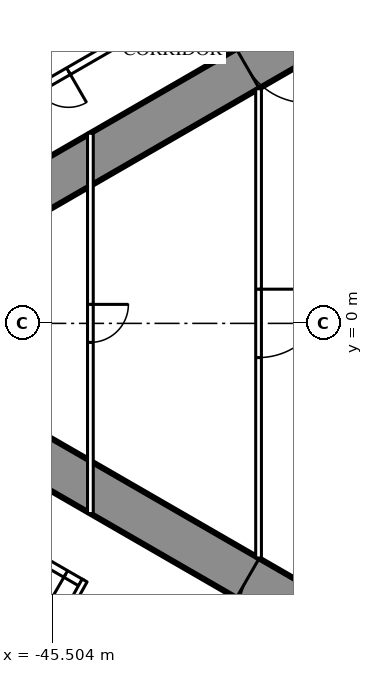
"""IFC4 building model, lengths in metres.
Left out: names, types, materials, properties, quantities, classifications, styles, units other than length and angle.
Written with IfcOpenShell. Run it as: python <this file> out.ifc"""

import sys

from ifc_helpers import new_model, si_unit, direction, frame, frame_2d, origin, place, context, subcontext, project, spatial, rectangle, extrude, element, fill, save


model = new_model("IFC4")
c1 = context("Model", 3, precision=1e-05, world=origin(), true_north=direction((0.0, 1.0)))
c2 = subcontext(c1, "Body", "Model", "MODEL_VIEW")
j1 = project(units=[si_unit("LENGTHUNIT", "METRE"), si_unit("PLANEANGLEUNIT", "RADIAN")], contexts=[c1])
p1 = place(None, origin())
s1 = spatial("IfcSite", under=j1, at=p1, CompositionType="ELEMENT")
p2 = place(p1, origin())
s2 = spatial("IfcBuilding", under=s1, at=p2, CompositionType="ELEMENT")
p3 = place(p2, frame((0.0, 0.0, 226.1)))
s3 = spatial("IfcBuildingStorey", under=s2, at=p3, CompositionType="ELEMENT", Elevation=226.1)
p4 = place(p3, frame((-27.2, 14.3, 0.0), z_axis=(0.0, 0.0, 1.0), x_axis=(-0.866026593062, -0.499997940104, 0.0)))
e1 = element("IfcWall", 1, at=p4, inside=s3, PredefinedType="SHEAR", context=c2, shape_type="SweptSolid", body=[
    extrude(rectangle(XDim=28.946, YDim=1.2, at=frame_2d((14.473, 0.0))), origin(), (0.0, 0.0, 1.0), 3.6),
])
p5 = place(p4, frame((4.6, 0.0, 0.0)))
e2 = element("IfcOpeningElement", 2, at=p5, cuts=e1, PredefinedType="OPENING", context=c2, shape_type="SweptSolid", body=[
    extrude(rectangle(XDim=1.0, YDim=2.2, at=frame_2d((0.5, 1.1))), frame((0.0, 0.61, 0.0), z_axis=(0.0, -1.0, 0.0), x_axis=(1.0, 0.0, 0.0)), (0.0, 0.0, 1.0), 1.22),
])
p6 = place(p4, frame((13.395, 0.0, 0.0)))
e3 = element("IfcOpeningElement", 3, at=p6, cuts=e1, PredefinedType="OPENING", context=c2, shape_type="SweptSolid", body=[
    extrude(rectangle(XDim=1.8, YDim=2.2, at=frame_2d((0.9, 1.1))), frame((0.0, 0.61, 0.0), z_axis=(0.0, -1.0, 0.0), x_axis=(1.0, 0.0, 0.0)), (0.0, 0.0, 1.0), 1.22),
])
p7 = place(p3, frame((-27.2, -14.3, 0.0), z_axis=(0.0, 0.0, 1.0), x_axis=(-0.866024021859, 0.500002393557, 0.0)))
e4 = element("IfcWall", 4, at=p7, inside=s3, PredefinedType="SHEAR", context=c2, shape_type="SweptSolid", body=[
    extrude(rectangle(XDim=27.907, YDim=1.2, at=frame_2d((13.954, 0.0))), origin(), (0.0, 0.0, 1.0), 3.6),
])
p8 = place(p7, frame((4.6, 0.0, 0.0)))
e5 = element("IfcOpeningElement", 5, at=p8, cuts=e4, PredefinedType="OPENING", context=c2, shape_type="SweptSolid", body=[
    extrude(rectangle(XDim=1.0, YDim=2.2, at=frame_2d((0.5, 1.1))), frame((0.0, 0.61, 0.0), z_axis=(0.0, -1.0, 0.0), x_axis=(1.0, 0.0, 0.0)), (0.0, 0.0, 1.0), 1.22),
])
p9 = place(p7, frame((13.395, 0.0, 0.0)))
e6 = element("IfcOpeningElement", 6, at=p9, cuts=e4, PredefinedType="OPENING", context=c2, shape_type="SweptSolid", body=[
    extrude(rectangle(XDim=1.8, YDim=2.2, at=frame_2d((0.9, 1.1))), frame((0.0, 0.61, 0.0), z_axis=(0.0, -1.0, 0.0), x_axis=(1.0, 0.0, 0.0)), (0.0, 0.0, 1.0), 1.22),
])
p10 = place(p3, frame((-44.715, -6.844, 0.0), z_axis=(0.0, 0.0, 1.0), x_axis=(-0.866025261224, 0.500000246922, 0.0)))
e7 = element("IfcWall", 7, at=p10, inside=s3, PredefinedType="PARTITIONING", context=c2, shape_type="SweptSolid", body=[
    extrude(rectangle(XDim=13.567, YDim=0.2, at=frame_2d((6.783, 0.0))), origin(), (0.0, 0.0, 1.0), 3.35),
])
p11 = place(p10, frame((6.266, 0.0, 0.0)))
e8 = element("IfcOpeningElement", 8, at=p11, cuts=e7, PredefinedType="OPENING", context=c2, shape_type="SweptSolid", body=[
    extrude(rectangle(XDim=0.95, YDim=2.2, at=frame_2d((0.475, 1.1))), frame((0.0, 0.11, 0.0), z_axis=(0.0, -1.0, 0.0), x_axis=(1.0, 0.0, 0.0)), (0.0, 0.0, 1.0), 0.22),
])
p12 = place(p10, frame((4.565, 0.0, 0.0)))
e9 = element("IfcOpeningElement", 9, at=p12, cuts=e7, PredefinedType="OPENING", context=c2, shape_type="SweptSolid", body=[
    extrude(rectangle(XDim=0.95, YDim=2.2, at=frame_2d((0.475, 1.1))), frame((0.0, 0.11, 0.0), z_axis=(0.0, -1.0, 0.0), x_axis=(1.0, 0.0, 0.0)), (0.0, 0.0, 1.0), 0.22),
])
p13 = place(p10, frame((0.5, 0.0, 0.0)))
e10 = element("IfcOpeningElement", 10, at=p13, cuts=e7, PredefinedType="OPENING", context=c2, shape_type="SweptSolid", body=[
    extrude(rectangle(XDim=0.967, YDim=2.2, at=frame_2d((0.483, 1.1))), frame((0.0, 0.11, 0.0), z_axis=(0.0, -1.0, 0.0), x_axis=(1.0, 0.0, 0.0)), (0.0, 0.0, 1.0), 0.22),
])
p14 = place(p3, frame((-44.652, -6.764, 0.0), z_axis=(0.0, 0.0, 1.0), x_axis=(-0.485424724123, -0.874278466629, 0.0)))
e11 = element("IfcWall", 11, at=p14, inside=s3, PredefinedType="PARTITIONING", context=c2, shape_type="SweptSolid", body=[
    extrude(rectangle(XDim=1.805, YDim=0.15, at=frame_2d((0.903, 0.0))), origin(), (0.0, 0.0, 1.0), 3.35),
])
p15 = place(p3, frame((-28.737, 16.068, 0.0), z_axis=(0.0, 0.0, 1.0), x_axis=(-0.866023901326, -0.500002602325, 0.0)))
e12 = element("IfcWall", 12, at=p15, inside=s3, PredefinedType="PARTITIONING", context=c2, shape_type="SweptSolid", body=[
    extrude(rectangle(XDim=20.192, YDim=0.2, at=frame_2d((10.096, 0.0))), origin(), (0.0, 0.0, 1.0), 3.35),
])
p16 = place(p15, frame((1.08, 0.0, 0.0)))
e13 = element("IfcOpeningElement", 13, at=p16, cuts=e12, PredefinedType="OPENING", context=c2, shape_type="SweptSolid", body=[
    extrude(rectangle(XDim=1.8, YDim=2.04, at=frame_2d((0.9, 1.02))), frame((0.0, 0.11, 0.0), z_axis=(0.0, -1.0, 0.0), x_axis=(1.0, 0.0, 0.0)), (0.0, 0.0, 1.0), 0.22),
])
p17 = place(p15, frame((6.86, 0.0, 0.0)))
e14 = element("IfcOpeningElement", 14, at=p17, cuts=e12, PredefinedType="OPENING", context=c2, shape_type="SweptSolid", body=[
    extrude(rectangle(XDim=1.0, YDim=2.2, at=frame_2d((0.5, 1.1))), frame((0.0, 0.11, 0.0), z_axis=(0.0, -1.0, 0.0), x_axis=(1.0, 0.0, 0.0)), (0.0, 0.0, 1.0), 0.22),
])
p18 = place(p15, frame((18.867, 0.0, 0.0)))
e15 = element("IfcOpeningElement", 15, at=p18, cuts=e12, PredefinedType="OPENING", context=c2, shape_type="SweptSolid", body=[
    extrude(rectangle(XDim=0.95, YDim=2.2, at=frame_2d((0.475, 1.1))), frame((0.0, 0.11, 0.0), z_axis=(0.0, -1.0, 0.0), x_axis=(1.0, 0.0, 0.0)), (0.0, 0.0, 1.0), 0.22),
])
p19 = place(p3, frame((-40.075, 6.174, 0.0), z_axis=(0.0, 0.0, 1.0), x_axis=(0.0, -1.0, 0.0)))
e16 = element("IfcWall", 16, at=p19, inside=s3, PredefinedType="PARTITIONING", context=c2, shape_type="SweptSolid", body=[
    extrude(rectangle(XDim=12.348, YDim=0.15, at=frame_2d((6.174, 0.0))), origin(), (0.0, 0.0, 1.0), 3.35),
])
p20 = place(p19, frame((5.274, 0.0, 0.0)))
e17 = element("IfcOpeningElement", 17, at=p20, cuts=e16, PredefinedType="OPENING", context=c2, shape_type="SweptSolid", body=[
    extrude(rectangle(XDim=1.8, YDim=2.2, at=frame_2d((0.9, 1.1))), frame((0.0, 0.085, 0.0), z_axis=(0.0, -1.0, 0.0), x_axis=(1.0, 0.0, 0.0)), (0.0, 0.0, 1.0), 0.17),
])
p21 = place(p3, frame((-44.5, 5.005, 0.0), z_axis=(0.0, 0.0, 1.0), x_axis=(0.0, -1.0, 0.0)))
e18 = element("IfcWall", 18, at=p21, inside=s3, PredefinedType="PARTITIONING", context=c2, shape_type="SweptSolid", body=[
    extrude(rectangle(XDim=10.009, YDim=0.15, at=frame_2d((5.005, 0.0))), origin(), (0.0, 0.0, 1.0), 2.5),
])
p22 = place(p21, frame((4.505, 0.0, 0.0)))
e19 = element("IfcOpeningElement", 19, at=p22, cuts=e18, PredefinedType="OPENING", context=c2, shape_type="SweptSolid", body=[
    extrude(rectangle(XDim=1.0, YDim=2.2, at=frame_2d((0.5, 1.1))), frame((0.0, 0.085, 0.0), z_axis=(0.0, -1.0, 0.0), x_axis=(1.0, 0.0, 0.0)), (0.0, 0.0, 1.0), 0.17),
])
p23 = place(p18, origin())
e20 = element("IfcDoor", 20, at=p23, inside=s3, OperationType="SINGLE_SWING_LEFT", PredefinedType="DOOR", context=c2, shape_type="SweptSolid", body=[
    extrude(rectangle(XDim=0.95, YDim=2.2, at=frame_2d((0.475, 1.1))), frame((0.0, 0.025, 0.0), z_axis=(0.0, -1.0, 0.0), x_axis=(1.0, 0.0, 0.0)), (0.0, 0.0, 1.0), 0.05),
])
fill(e15, e20)
p24 = place(p13, origin())
e21 = element("IfcDoor", 21, at=p24, inside=s3, OperationType="SINGLE_SWING_LEFT", PredefinedType="DOOR", context=c2, shape_type="SweptSolid", body=[
    extrude(rectangle(XDim=0.967, YDim=2.2, at=frame_2d((0.483, 1.1))), frame((0.0, 0.025, 0.0), z_axis=(0.0, -1.0, 0.0), x_axis=(1.0, 0.0, 0.0)), (0.0, 0.0, 1.0), 0.05),
])
fill(e10, e21)
p25 = place(p20, origin())
e22 = element("IfcDoor", 22, at=p25, inside=s3, OperationType="DOUBLE_DOOR_SINGLE_SWING", PredefinedType="DOOR", context=c2, shape_type="SweptSolid", body=[
    extrude(rectangle(XDim=1.8, YDim=2.2, at=frame_2d((0.9, 1.1))), frame((0.0, 0.025, 0.0), z_axis=(0.0, -1.0, 0.0), x_axis=(1.0, 0.0, 0.0)), (0.0, 0.0, 1.0), 0.05),
])
fill(e17, e22)
p26 = place(p22, origin())
e23 = element("IfcDoor", 23, at=p26, inside=s3, OperationType="SINGLE_SWING_LEFT", PredefinedType="DOOR", context=c2, shape_type="SweptSolid", body=[
    extrude(rectangle(XDim=1.0, YDim=2.2, at=frame_2d((0.5, 1.1))), frame((0.0, 0.025, 0.0), z_axis=(0.0, -1.0, 0.0), x_axis=(1.0, 0.0, 0.0)), (0.0, 0.0, 1.0), 0.05),
])
fill(e19, e23)
p27 = place(p6, origin())
e24 = element("IfcDoor", 24, at=p27, inside=s3, OperationType="DOUBLE_DOOR_SINGLE_SWING", PredefinedType="DOOR", context=c2, shape_type="SweptSolid", body=[
    extrude(rectangle(XDim=1.8, YDim=2.2, at=frame_2d((0.9, 1.1))), frame((0.0, 0.025, 0.0), z_axis=(0.0, -1.0, 0.0), x_axis=(1.0, 0.0, 0.0)), (0.0, 0.0, 1.0), 0.05),
])
fill(e3, e24)
p28 = place(p9, origin())
e25 = element("IfcDoor", 25, at=p28, inside=s3, OperationType="DOUBLE_DOOR_SINGLE_SWING", PredefinedType="DOOR", context=c2, shape_type="SweptSolid", body=[
    extrude(rectangle(XDim=1.8, YDim=2.2, at=frame_2d((0.9, 1.1))), frame((0.0, 0.025, 0.0), z_axis=(0.0, -1.0, 0.0), x_axis=(1.0, 0.0, 0.0)), (0.0, 0.0, 1.0), 0.05),
])
fill(e6, e25)
save(model, sys.argv[1])
